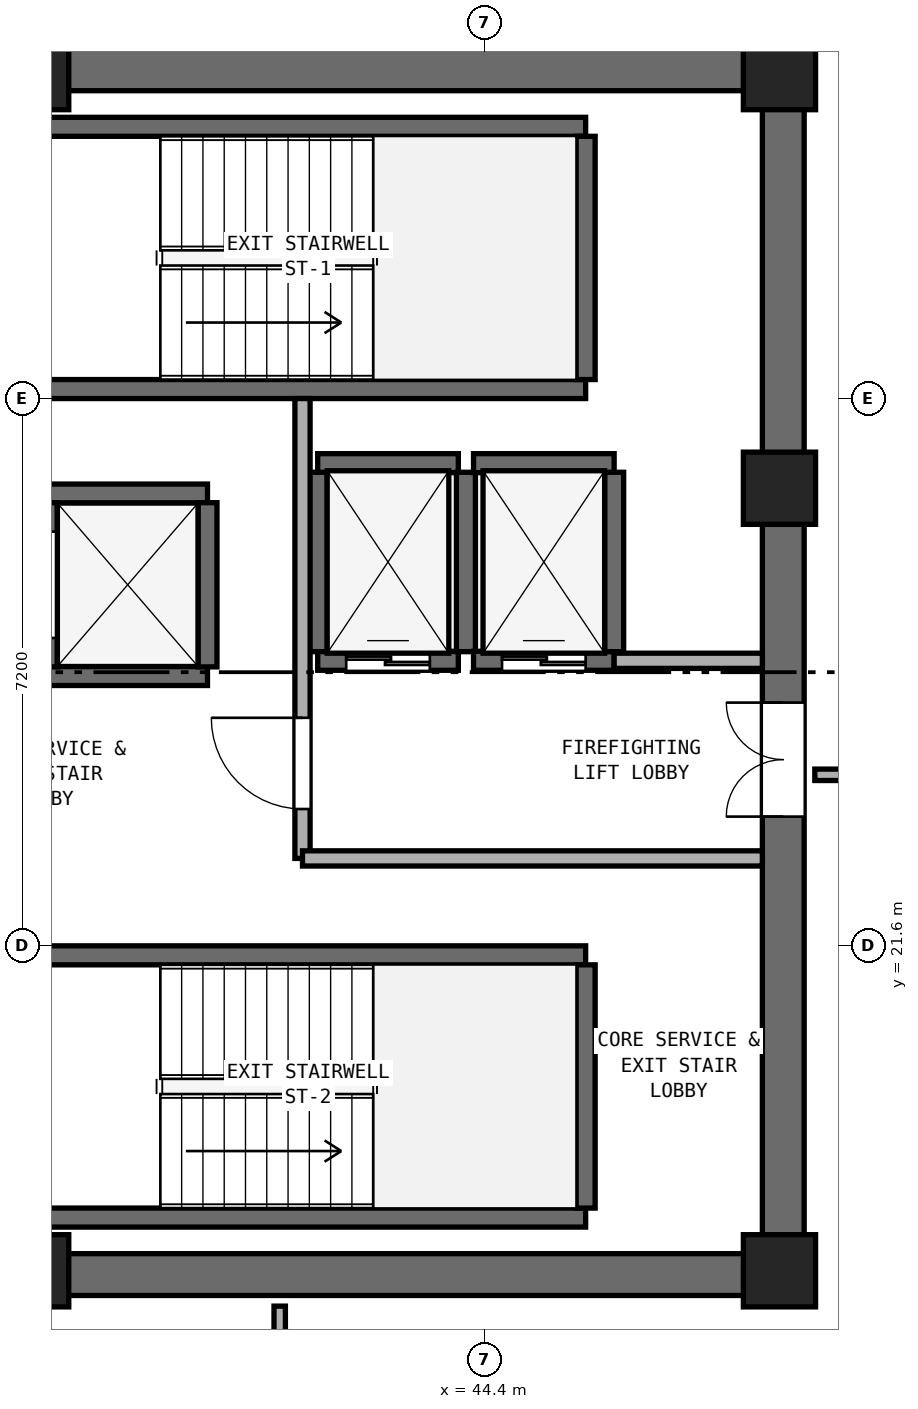
"""IFC4 building model, lengths in metres.
Left out: names, types, materials, properties, quantities, classifications, styles, units other than length and angle.
Written with IfcOpenShell. Run it as: python <this file> out.ifc"""

import sys

from ifc_helpers import new_model, si_unit, direction, frame, frame_2d, origin, origin_2d, place, context, subcontext, project, spatial, rectangle, extrude, element, fill, save


model = new_model("IFC4")
c1 = context("Model", 3, precision=1e-05, world=origin(), true_north=direction((0.0, 1.0)))
c2 = subcontext(c1, "Body", "Model", "MODEL_VIEW")
j1 = project(units=[si_unit("LENGTHUNIT", "METRE"), si_unit("PLANEANGLEUNIT", "RADIAN")], contexts=[c1])
p1 = place(None, origin())
s1 = spatial("IfcSite", under=j1, at=p1, CompositionType="ELEMENT")
p2 = place(p1, origin())
s2 = spatial("IfcBuilding", under=s1, at=p2, CompositionType="ELEMENT")
p3 = place(p2, frame((0.0, 0.0, 147.8)))
s3 = spatial("IfcBuildingStorey", under=s2, at=p3, CompositionType="ELEMENT", Elevation=147.8)
for number, where, z_axis, x_axis in (
    (1, (25.4, 17.275, 0.0), (0.0, 0.0, 1.0), (1.0, 0.0, 0.0)),
    (2, (25.4, 33.125, 0.0), (0.0, 0.0, 1.0), (1.0, 0.0, 0.0)),
):
    element("IfcWall", number, at=place(p3, frame(where, z_axis=z_axis, x_axis=x_axis)), inside=s3, PredefinedType="SHEAR", context=c2, shape_type="SweptSolid", body=[
        extrude(rectangle(XDim=23.2, YDim=0.55, at=frame_2d((11.6, 0.0))), origin(), (0.0, 0.0, 1.0), 3.54),
    ])
p4 = place(p3, frame((48.325, 17.55, 0.0), z_axis=(0.0, 0.0, 1.0), x_axis=(0.0, 1.0, 0.0)))
e3 = element("IfcWall", 3, at=p4, inside=s3, PredefinedType="SHEAR", context=c2, shape_type="SweptSolid", body=[
    extrude(rectangle(XDim=15.3, YDim=0.55, at=frame_2d((7.65, 0.0))), origin(), (0.0, 0.0, 1.0), 3.54),
])
p5 = place(p4, frame((5.75, 0.0, 0.0)))
e4 = element("IfcOpeningElement", 4, at=p5, cuts=e3, PredefinedType="OPENING", context=c2, shape_type="SweptSolid", body=[
    extrude(rectangle(XDim=1.5, YDim=2.15, at=frame_2d((0.75, 1.075))), frame((0.0, 0.285, 0.0), z_axis=(0.0, -1.0, 0.0), x_axis=(1.0, 0.0, 0.0)), (0.0, 0.0, 1.0), 0.57),
])
for number, where, z_axis, x_axis in (
    (5, (38.45, 17.325, 0.0), (0.0, 0.0, 1.0), (1.0, 0.0, 0.0)),
    (6, (48.275, 17.325, 0.0), (0.0, 0.0, 1.0), (1.0, 0.0, 0.0)),
    (7, (48.275, 27.62, 0.0), (0.0, 0.0, 1.0), (1.0, 0.0, 0.0)),
    (8, (48.275, 33.075, 0.0), (0.0, 0.0, 1.0), (1.0, 0.0, 0.0)),
    (9, (38.45, 33.075, 0.0), (0.0, 0.0, 1.0), (1.0, 0.0, 0.0)),
):
    element("IfcColumn", number, at=place(p3, frame(where, z_axis=z_axis, x_axis=x_axis)), inside=s3, PredefinedType="PILASTER", context=c2, shape_type="SweptSolid", body=[
        extrude(rectangle(XDim=0.95, YDim=0.95, at=origin_2d()), origin(), (0.0, 0.0, 1.0), 3.8),
    ])
for number, where, z_axis, x_axis in (
    (10, (38.425, 28.925, 0.0), (0.0, 0.0, 1.0), (1.0, 0.0, 0.0)),
    (11, (38.425, 32.375, 0.0), (0.0, 0.0, 1.0), (1.0, 0.0, 0.0)),
):
    element("IfcWall", number, at=place(p3, frame(where, z_axis=z_axis, x_axis=x_axis)), inside=s3, PredefinedType="SHEAR", context=c2, shape_type="SweptSolid", body=[
        extrude(rectangle(XDim=7.3, YDim=0.25, at=frame_2d((3.65, 0.0))), origin(), (0.0, 0.0, 1.0), 3.54),
    ])
p6 = place(p3, frame((45.725, 29.05, 0.0), z_axis=(0.0, 0.0, 1.0), x_axis=(0.0, 1.0, 0.0)))
e12 = element("IfcWall", 12, at=p6, inside=s3, PredefinedType="SHEAR", context=c2, shape_type="SweptSolid", body=[
    extrude(rectangle(XDim=3.2, YDim=0.25, at=frame_2d((1.6, 0.0))), origin(), (0.0, 0.0, 1.0), 3.54),
])
for number, where, z_axis, x_axis in (
    (13, (38.425, 18.025, 0.0), (0.0, 0.0, 1.0), (1.0, 0.0, 0.0)),
    (14, (38.425, 21.475, 0.0), (0.0, 0.0, 1.0), (1.0, 0.0, 0.0)),
):
    element("IfcWall", number, at=place(p3, frame(where, z_axis=z_axis, x_axis=x_axis)), inside=s3, PredefinedType="SHEAR", context=c2, shape_type="SweptSolid", body=[
        extrude(rectangle(XDim=7.3, YDim=0.25, at=frame_2d((3.65, 0.0))), origin(), (0.0, 0.0, 1.0), 3.54),
    ])
p7 = place(p3, frame((45.725, 18.15, 0.0), z_axis=(0.0, 0.0, 1.0), x_axis=(0.0, 1.0, 0.0)))
e15 = element("IfcWall", 15, at=p7, inside=s3, PredefinedType="SHEAR", context=c2, shape_type="SweptSolid", body=[
    extrude(rectangle(XDim=3.2, YDim=0.25, at=frame_2d((1.6, 0.0))), origin(), (0.0, 0.0, 1.0), 3.54),
])
p8 = place(p3, frame((42.2, 25.35, 0.0), z_axis=(0.0, 0.0, 1.0), x_axis=(1.0, 0.0, 0.0)))
e16 = element("IfcWall", 16, at=p8, inside=s3, PredefinedType="SHEAR", context=c2, shape_type="SweptSolid", body=[
    extrude(rectangle(XDim=1.85, YDim=0.25, at=frame_2d((0.925, 0.0))), origin(), (0.0, 0.0, 1.0), 3.54),
])
p9 = place(p8, frame((0.375, 0.0, 0.0)))
e17 = element("IfcOpeningElement", 17, at=p9, cuts=e16, PredefinedType="OPENING", context=c2, shape_type="SweptSolid", body=[
    extrude(rectangle(XDim=1.1, YDim=2.15, at=frame_2d((0.55, 1.075))), frame((0.0, 0.135, 0.0), z_axis=(0.0, -1.0, 0.0), x_axis=(1.0, 0.0, 0.0)), (0.0, 0.0, 1.0), 0.27),
])
p10 = place(p3, frame((42.2, 27.95, 0.0), z_axis=(0.0, 0.0, 1.0), x_axis=(1.0, 0.0, 0.0)))
e18 = element("IfcWall", 18, at=p10, inside=s3, PredefinedType="SHEAR", context=c2, shape_type="SweptSolid", body=[
    extrude(rectangle(XDim=1.85, YDim=0.25, at=frame_2d((0.925, 0.0))), origin(), (0.0, 0.0, 1.0), 3.54),
])
for number, where, z_axis, x_axis in (
    (19, (42.2, 25.47, 0.0), (0.0, 0.0, 1.0), (0.0, 1.0, 0.0)),
    (20, (44.15, 25.47, 0.0), (0.0, 0.0, 1.0), (0.0, 1.0, 0.0)),
):
    element("IfcWall", number, at=place(p3, frame(where, z_axis=z_axis, x_axis=x_axis)), inside=s3, PredefinedType="SHEAR", context=c2, shape_type="SweptSolid", body=[
        extrude(rectangle(XDim=2.36, YDim=0.25, at=frame_2d((1.18, 0.0))), origin(), (0.0, 0.0, 1.0), 3.54),
    ])
p11 = place(p3, frame((44.25, 25.35, 0.0), z_axis=(0.0, 0.0, 1.0), x_axis=(1.0, 0.0, 0.0)))
e21 = element("IfcWall", 21, at=p11, inside=s3, PredefinedType="SHEAR", context=c2, shape_type="SweptSolid", body=[
    extrude(rectangle(XDim=1.85, YDim=0.25, at=frame_2d((0.925, 0.0))), origin(), (0.0, 0.0, 1.0), 3.54),
])
p12 = place(p11, frame((0.375, 0.0, 0.0)))
e22 = element("IfcOpeningElement", 22, at=p12, cuts=e21, PredefinedType="OPENING", context=c2, shape_type="SweptSolid", body=[
    extrude(rectangle(XDim=1.1, YDim=2.15, at=frame_2d((0.55, 1.075))), frame((0.0, 0.135, 0.0), z_axis=(0.0, -1.0, 0.0), x_axis=(1.0, 0.0, 0.0)), (0.0, 0.0, 1.0), 0.27),
])
p13 = place(p3, frame((44.25, 27.95, 0.0), z_axis=(0.0, 0.0, 1.0), x_axis=(1.0, 0.0, 0.0)))
e23 = element("IfcWall", 23, at=p13, inside=s3, PredefinedType="SHEAR", context=c2, shape_type="SweptSolid", body=[
    extrude(rectangle(XDim=1.85, YDim=0.25, at=frame_2d((0.925, 0.0))), origin(), (0.0, 0.0, 1.0), 3.54),
])
p14 = place(p3, frame((46.1, 25.47, 0.0), z_axis=(0.0, 0.0, 1.0), x_axis=(0.0, 1.0, 0.0)))
e24 = element("IfcWall", 24, at=p14, inside=s3, PredefinedType="SHEAR", context=c2, shape_type="SweptSolid", body=[
    extrude(rectangle(XDim=2.36, YDim=0.25, at=frame_2d((1.18, 0.0))), origin(), (0.0, 0.0, 1.0), 3.54),
])
for number, where, z_axis, x_axis in (
    (25, (38.65, 25.15, 0.0), (0.0, 0.0, 1.0), (1.0, 0.0, 0.0)),
    (26, (38.65, 27.55, 0.0), (0.0, 0.0, 1.0), (1.0, 0.0, 0.0)),
):
    element("IfcWall", number, at=place(p3, frame(where, z_axis=z_axis, x_axis=x_axis)), inside=s3, PredefinedType="SHEAR", context=c2, shape_type="SweptSolid", body=[
        extrude(rectangle(XDim=2.1, YDim=0.25, at=frame_2d((1.05, 0.0))), origin(), (0.0, 0.0, 1.0), 3.54),
    ])
p15 = place(p3, frame((38.65, 25.27, 0.0), z_axis=(0.0, 0.0, 1.0), x_axis=(0.0, 1.0, 0.0)))
e27 = element("IfcWall", 27, at=p15, inside=s3, PredefinedType="SHEAR", context=c2, shape_type="SweptSolid", body=[
    extrude(rectangle(XDim=2.16, YDim=0.25, at=frame_2d((1.08, 0.0))), origin(), (0.0, 0.0, 1.0), 3.54),
])
p16 = place(p15, frame((0.38, 0.0, 0.0)))
e28 = element("IfcOpeningElement", 28, at=p16, cuts=e27, PredefinedType="OPENING", context=c2, shape_type="SweptSolid", body=[
    extrude(rectangle(XDim=1.4, YDim=2.2, at=frame_2d((0.7, 1.1))), frame((0.0, 0.135, 0.0), z_axis=(0.0, -1.0, 0.0), x_axis=(1.0, 0.0, 0.0)), (0.0, 0.0, 1.0), 0.27),
])
p17 = place(p3, frame((40.75, 25.27, 0.0), z_axis=(0.0, 0.0, 1.0), x_axis=(0.0, 1.0, 0.0)))
e29 = element("IfcWall", 29, at=p17, inside=s3, PredefinedType="SHEAR", context=c2, shape_type="SweptSolid", body=[
    extrude(rectangle(XDim=2.16, YDim=0.25, at=frame_2d((1.08, 0.0))), origin(), (0.0, 0.0, 1.0), 3.54),
])
p18 = place(p3, frame((42.0, 22.75, 0.0), z_axis=(0.0, 0.0, 1.0), x_axis=(0.0, 1.0, 0.0)))
e30 = element("IfcWall", 30, at=p18, inside=s3, PredefinedType="SOLIDWALL", context=c2, shape_type="SweptSolid", body=[
    extrude(rectangle(XDim=6.05, YDim=0.2, at=frame_2d((3.025, 0.0))), origin(), (0.0, 0.0, 1.0), 3.54),
])
p19 = place(p18, frame((0.65, 0.0, 0.0)))
e31 = element("IfcOpeningElement", 31, at=p19, cuts=e30, PredefinedType="OPENING", context=c2, shape_type="SweptSolid", body=[
    extrude(rectangle(XDim=1.2, YDim=2.15, at=frame_2d((0.6, 1.075))), frame((0.0, 0.11, 0.0), z_axis=(0.0, -1.0, 0.0), x_axis=(1.0, 0.0, 0.0)), (0.0, 0.0, 1.0), 0.22),
])
p20 = place(p3, frame((42.0, 22.75, 0.0), z_axis=(0.0, 0.0, 1.0), x_axis=(1.0, 0.0, 0.0)))
e32 = element("IfcWall", 32, at=p20, inside=s3, PredefinedType="SOLIDWALL", context=c2, shape_type="SweptSolid", body=[
    extrude(rectangle(XDim=6.05, YDim=0.2, at=frame_2d((3.025, 0.0))), origin(), (0.0, 0.0, 1.0), 3.54),
])
p21 = place(p3, frame((46.1, 25.35, 0.0), z_axis=(0.0, 0.0, 1.0), x_axis=(1.0, 0.0, 0.0)))
e33 = element("IfcWall", 33, at=p21, inside=s3, PredefinedType="SOLIDWALL", context=c2, shape_type="SweptSolid", body=[
    extrude(rectangle(XDim=1.95, YDim=0.2, at=frame_2d((0.975, 0.0))), origin(), (0.0, 0.0, 1.0), 3.54),
])
p22 = place(p3, frame((41.7, 2.621, 0.0), z_axis=(0.0, 0.0, 1.0), x_axis=(0.0, 1.0, 0.0)))
e34 = element("IfcWall", 34, at=p22, inside=s3, PredefinedType="PARTITIONING", context=c2, shape_type="SweptSolid", body=[
    extrude(rectangle(XDim=14.239, YDim=0.15, at=frame_2d((7.119, 0.0))), origin(), (0.0, 0.0, 1.0), 3.54),
])
p23 = place(p3, frame((48.74, 23.85, 0.0), z_axis=(0.0, 0.0, 1.0), x_axis=(1.0, 0.0, 0.0)))
e35 = element("IfcWall", 35, at=p23, inside=s3, PredefinedType="PARTITIONING", context=c2, shape_type="SweptSolid", body=[
    extrude(rectangle(XDim=14.255, YDim=0.15, at=frame_2d((7.127, 0.0))), origin(), (0.0, 0.0, 1.0), 3.54),
])
p24 = place(p23, frame((6.677, 0.0, 0.0)))
e36 = element("IfcOpeningElement", 36, at=p24, cuts=e35, PredefinedType="OPENING", context=c2, shape_type="SweptSolid", body=[
    extrude(rectangle(XDim=0.9, YDim=2.1, at=frame_2d((0.45, 1.05))), frame((0.0, 0.085, 0.0), z_axis=(0.0, -1.0, 0.0), x_axis=(1.0, 0.0, 0.0)), (0.0, 0.0, 1.0), 0.17),
])
p25 = place(p9, origin())
e37 = element("IfcDoor", 37, at=p25, inside=s3, OperationType="DOUBLE_DOOR_SLIDING", PredefinedType="DOOR", context=c2, shape_type="SweptSolid", body=[
    extrude(rectangle(XDim=1.1, YDim=2.15, at=frame_2d((0.55, 1.075))), frame((0.0, 0.025, 0.0), z_axis=(0.0, -1.0, 0.0), x_axis=(1.0, 0.0, 0.0)), (0.0, 0.0, 1.0), 0.05),
])
fill(e17, e37)
p26 = place(p12, origin())
e38 = element("IfcDoor", 38, at=p26, inside=s3, OperationType="DOUBLE_DOOR_SLIDING", PredefinedType="DOOR", context=c2, shape_type="SweptSolid", body=[
    extrude(rectangle(XDim=1.1, YDim=2.15, at=frame_2d((0.55, 1.075))), frame((0.0, 0.025, 0.0), z_axis=(0.0, -1.0, 0.0), x_axis=(1.0, 0.0, 0.0)), (0.0, 0.0, 1.0), 0.05),
])
fill(e22, e38)
p27 = place(p19, origin())
e39 = element("IfcDoor", 39, at=p27, inside=s3, OperationType="SINGLE_SWING_RIGHT", PredefinedType="DOOR", context=c2, shape_type="SweptSolid", body=[
    extrude(rectangle(XDim=1.2, YDim=2.15, at=frame_2d((0.6, 1.075))), frame((0.0, 0.025, 0.0), z_axis=(0.0, -1.0, 0.0), x_axis=(1.0, 0.0, 0.0)), (0.0, 0.0, 1.0), 0.05),
])
fill(e31, e39)
p28 = place(p5, origin())
e40 = element("IfcDoor", 40, at=p28, inside=s3, OperationType="DOUBLE_DOOR_SINGLE_SWING", PredefinedType="DOOR", context=c2, shape_type="SweptSolid", body=[
    extrude(rectangle(XDim=1.5, YDim=2.15, at=frame_2d((0.75, 1.075))), frame((0.0, 0.025, 0.0), z_axis=(0.0, -1.0, 0.0), x_axis=(1.0, 0.0, 0.0)), (0.0, 0.0, 1.0), 0.05),
])
fill(e4, e40)
save(model, sys.argv[1])
